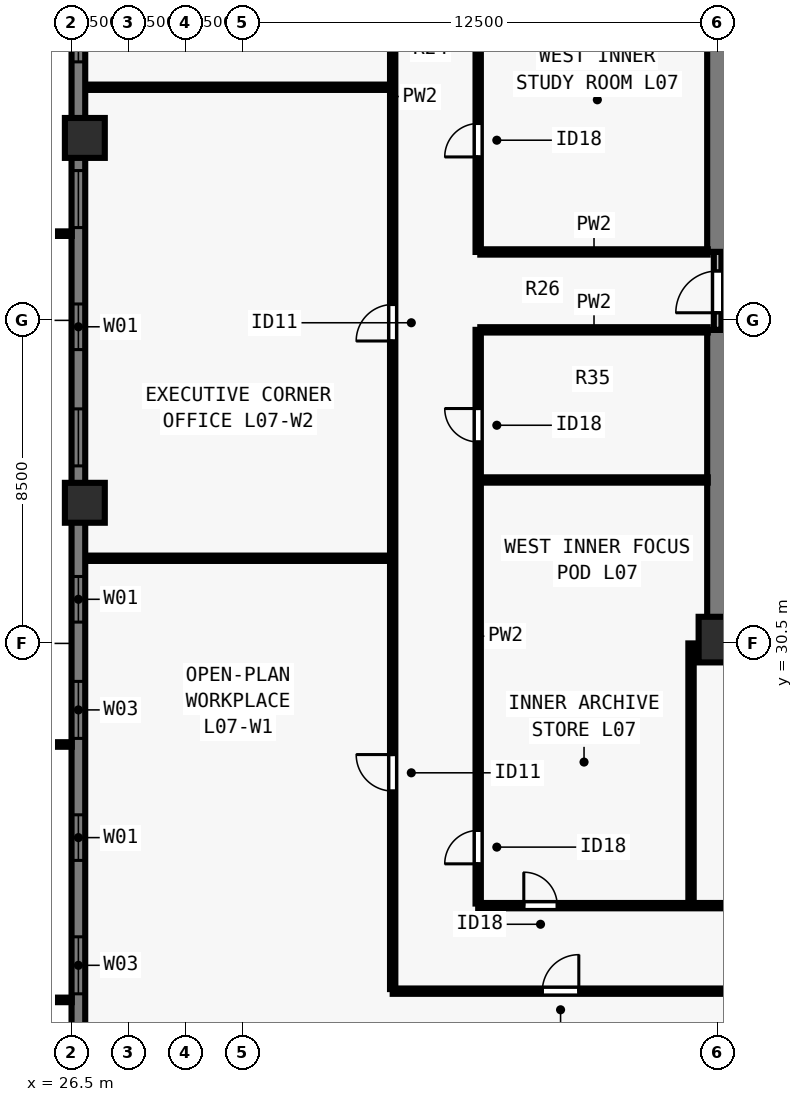
"""IFC4 building model, lengths in metres.
Left out: names, types, materials, properties, quantities, classifications, styles, units other than length and angle.
Written with IfcOpenShell. Run it as: python <this file> out.ifc"""

import sys

from ifc_helpers import new_model, si_unit, direction, frame, frame_2d, origin, origin_2d, place, context, subcontext, project, spatial, rectangle, extrude, element, fill, save


model = new_model("IFC4")
c1 = context("Model", 3, precision=1e-05, world=origin(), true_north=direction((0.0, 1.0)))
c2 = subcontext(c1, "Body", "Model", "MODEL_VIEW")
j1 = project(units=[si_unit("LENGTHUNIT", "METRE"), si_unit("PLANEANGLEUNIT", "RADIAN")], contexts=[c1])
p1 = place(None, origin())
s1 = spatial("IfcSite", under=j1, at=p1, CompositionType="ELEMENT")
p2 = place(p1, origin())
s2 = spatial("IfcBuilding", under=s1, at=p2, CompositionType="ELEMENT")
p3 = place(p2, frame((0.0, 0.0, 30.5)))
s3 = spatial("IfcBuildingStorey", under=s2, at=p3, CompositionType="ELEMENT", Elevation=30.5)
p4 = place(p3, frame((43.6, 30.6, 0.0), z_axis=(0.0, 0.0, 1.0), x_axis=(1.0, 0.0, 0.0)))
e1 = element("IfcColumn", 1, at=p4, inside=s3, PredefinedType="COLUMN", context=c2, shape_type="SweptSolid", body=[
    extrude(rectangle(XDim=1.2, YDim=1.2, at=origin_2d()), origin(), (0.0, 0.0, 1.0), 3.5),
])
for number, where, z_axis, x_axis in (
    (2, (26.85, 43.8, 0.0), (0.0, 0.0, 1.0), (0.0, 1.0, 0.0)),
    (3, (26.85, 34.2, 0.0), (0.0, 0.0, 1.0), (0.0, 1.0, 0.0)),
):
    element("IfcColumn", number, at=place(p3, frame(where, z_axis=z_axis, x_axis=x_axis)), inside=s3, PredefinedType="COLUMN", context=c2, shape_type="SweptSolid", body=[
        extrude(rectangle(XDim=1.05, YDim=1.05, at=origin_2d()), origin(), (0.0, 0.0, 1.0), 3.5),
    ])
p5 = place(p3, frame((26.68, 16.5, 0.0), z_axis=(0.0, 0.0, 1.0), x_axis=(0.0, 1.0, 0.0)))
e4 = element("IfcWall", 4, at=p5, inside=s3, PredefinedType="SOLIDWALL", context=c2, shape_type="SweptSolid", body=[
    extrude(rectangle(XDim=44.662, YDim=0.36, at=frame_2d((22.331, 0.0))), origin(), (0.0, 0.0, 1.0), 3.28),
])
p6 = place(p5, frame((4.78, 0.0, 0.8)))
e5 = element("IfcOpeningElement", 5, at=p6, cuts=e4, PredefinedType="OPENING", context=c2, shape_type="SweptSolid", body=[
    extrude(rectangle(XDim=1.5, YDim=1.544, at=frame_2d((0.75, 0.772))), frame((0.0, 0.19, 0.0), z_axis=(0.0, -1.0, 0.0), x_axis=(1.0, 0.0, 0.0)), (0.0, 0.0, 1.0), 0.38),
])
p7 = place(p5, frame((8.29, 0.0, 0.8)))
e6 = element("IfcOpeningElement", 6, at=p7, cuts=e4, PredefinedType="OPENING", context=c2, shape_type="SweptSolid", body=[
    extrude(rectangle(XDim=1.2, YDim=1.544, at=frame_2d((0.6, 0.772))), frame((0.0, 0.19, 0.0), z_axis=(0.0, -1.0, 0.0), x_axis=(1.0, 0.0, 0.0)), (0.0, 0.0, 1.0), 0.38),
])
p8 = place(p5, frame((11.5, 0.0, 0.8)))
e7 = element("IfcOpeningElement", 7, at=p8, cuts=e4, PredefinedType="OPENING", context=c2, shape_type="SweptSolid", body=[
    extrude(rectangle(XDim=1.5, YDim=1.544, at=frame_2d((0.75, 0.772))), frame((0.0, 0.19, 0.0), z_axis=(0.0, -1.0, 0.0), x_axis=(1.0, 0.0, 0.0)), (0.0, 0.0, 1.0), 0.38),
])
p9 = place(p5, frame((14.561, 0.0, 0.8)))
e8 = element("IfcOpeningElement", 8, at=p9, cuts=e4, PredefinedType="OPENING", context=c2, shape_type="SweptSolid", body=[
    extrude(rectangle(XDim=1.2, YDim=1.544, at=frame_2d((0.6, 0.772))), frame((0.0, 0.19, 0.0), z_axis=(0.0, -1.0, 0.0), x_axis=(1.0, 0.0, 0.0)), (0.0, 0.0, 1.0), 0.38),
])
p10 = place(p5, frame((18.671, 0.0, 0.8)))
e9 = element("IfcOpeningElement", 9, at=p10, cuts=e4, PredefinedType="OPENING", context=c2, shape_type="SweptSolid", body=[
    extrude(rectangle(XDim=1.5, YDim=1.544, at=frame_2d((0.75, 0.772))), frame((0.0, 0.19, 0.0), z_axis=(0.0, -1.0, 0.0), x_axis=(1.0, 0.0, 0.0)), (0.0, 0.0, 1.0), 0.38),
])
p11 = place(p5, frame((21.731, 0.0, 0.8)))
e10 = element("IfcOpeningElement", 10, at=p11, cuts=e4, PredefinedType="OPENING", context=c2, shape_type="SweptSolid", body=[
    extrude(rectangle(XDim=1.2, YDim=1.544, at=frame_2d((0.6, 0.772))), frame((0.0, 0.19, 0.0), z_axis=(0.0, -1.0, 0.0), x_axis=(1.0, 0.0, 0.0)), (0.0, 0.0, 1.0), 0.38),
])
p12 = place(p5, frame((24.941, 0.0, 0.8)))
e11 = element("IfcOpeningElement", 11, at=p12, cuts=e4, PredefinedType="OPENING", context=c2, shape_type="SweptSolid", body=[
    extrude(rectangle(XDim=1.5, YDim=1.544, at=frame_2d((0.75, 0.772))), frame((0.0, 0.19, 0.0), z_axis=(0.0, -1.0, 0.0), x_axis=(1.0, 0.0, 0.0)), (0.0, 0.0, 1.0), 0.38),
])
p13 = place(p5, frame((29.302, 0.0, 0.8)))
e12 = element("IfcOpeningElement", 12, at=p13, cuts=e4, PredefinedType="OPENING", context=c2, shape_type="SweptSolid", body=[
    extrude(rectangle(XDim=1.2, YDim=1.544, at=frame_2d((0.6, 0.772))), frame((0.0, 0.19, 0.0), z_axis=(0.0, -1.0, 0.0), x_axis=(1.0, 0.0, 0.0)), (0.0, 0.0, 1.0), 0.38),
])
p14 = place(p5, frame((31.662, 0.0, 0.8)))
e13 = element("IfcOpeningElement", 13, at=p14, cuts=e4, PredefinedType="OPENING", context=c2, shape_type="SweptSolid", body=[
    extrude(rectangle(XDim=1.5, YDim=1.544, at=frame_2d((0.75, 0.772))), frame((0.0, 0.19, 0.0), z_axis=(0.0, -1.0, 0.0), x_axis=(1.0, 0.0, 0.0)), (0.0, 0.0, 1.0), 0.38),
])
p15 = place(p5, frame((35.172, 0.0, 0.8)))
e14 = element("IfcOpeningElement", 14, at=p15, cuts=e4, PredefinedType="OPENING", context=c2, shape_type="SweptSolid", body=[
    extrude(rectangle(XDim=1.2, YDim=1.544, at=frame_2d((0.6, 0.772))), frame((0.0, 0.19, 0.0), z_axis=(0.0, -1.0, 0.0), x_axis=(1.0, 0.0, 0.0)), (0.0, 0.0, 1.0), 0.38),
])
p16 = place(p5, frame((38.382, 0.0, 0.8)))
e15 = element("IfcOpeningElement", 15, at=p16, cuts=e4, PredefinedType="OPENING", context=c2, shape_type="SweptSolid", body=[
    extrude(rectangle(XDim=1.5, YDim=1.544, at=frame_2d((0.75, 0.772))), frame((0.0, 0.19, 0.0), z_axis=(0.0, -1.0, 0.0), x_axis=(1.0, 0.0, 0.0)), (0.0, 0.0, 1.0), 0.38),
])
p17 = place(p3, frame((43.225, 30.5, 0.0), z_axis=(0.0, 0.0, 1.0), x_axis=(1.0, 0.0, 0.0)))
e16 = element("IfcWall", 16, at=p17, inside=s3, PredefinedType="SHEAR", context=c2, shape_type="SweptSolid", body=[
    extrude(rectangle(XDim=17.55, YDim=0.55, at=frame_2d((8.775, 0.0))), origin(), (0.0, 0.0, 1.0), 3.28),
])
p18 = place(p3, frame((43.5, 30.765, 0.0), z_axis=(0.0, 0.0, 1.0), x_axis=(0.0, 1.0, 0.0)))
e17 = element("IfcWall", 17, at=p18, inside=s3, PredefinedType="SHEAR", context=c2, shape_type="SweptSolid", body=[
    extrude(rectangle(XDim=7.985, YDim=0.55, at=frame_2d((3.993, 0.0))), origin(), (0.0, 0.0, 1.0), 3.28),
])
p19 = place(p3, frame((43.5, 40.8, 0.0), z_axis=(0.0, 0.0, 1.0), x_axis=(0.0, 1.0, 0.0)))
e18 = element("IfcWall", 18, at=p19, inside=s3, PredefinedType="SHEAR", context=c2, shape_type="SweptSolid", body=[
    extrude(rectangle(XDim=6.435, YDim=0.55, at=frame_2d((3.218, 0.0))), origin(), (0.0, 0.0, 1.0), 3.28),
])
p20 = place(p3, frame((43.5, 38.75, 0.0), z_axis=(0.0, 0.0, 1.0), x_axis=(0.0, 1.0, 0.0)))
e19 = element("IfcWall", 19, at=p20, inside=s3, PredefinedType="SOLIDWALL", context=c2, shape_type="SweptSolid", body=[
    extrude(rectangle(XDim=2.05, YDim=0.2, at=frame_2d((1.025, 0.0))), origin(), (0.0, 0.0, 1.0), 3.28),
])
p21 = place(p20, frame((0.45, 0.0, 0.0)))
e20 = element("IfcOpeningElement", 20, at=p21, cuts=e19, PredefinedType="OPENING", context=c2, shape_type="SweptSolid", body=[
    extrude(rectangle(XDim=1.1, YDim=2.15, at=frame_2d((0.55, 1.075))), frame((0.0, 0.11, 0.0), z_axis=(0.0, -1.0, 0.0), x_axis=(1.0, 0.0, 0.0)), (0.0, 0.0, 1.0), 0.22),
])
p22 = place(p3, frame((34.95, 21.35, 0.0), z_axis=(0.0, 0.0, 1.0), x_axis=(1.0, 0.0, 0.0)))
e21 = element("IfcWall", 21, at=p22, inside=s3, PredefinedType="PARTITIONING", context=c2, shape_type="SweptSolid", body=[
    extrude(rectangle(XDim=34.1, YDim=0.14, at=frame_2d((17.05, 0.0))), origin(), (0.0, 0.0, 1.0), 3.28),
])
p23 = place(p22, frame((3.938, 0.0, 0.0)))
e22 = element("IfcOpeningElement", 22, at=p23, cuts=e21, PredefinedType="OPENING", context=c2, shape_type="SweptSolid", body=[
    extrude(rectangle(XDim=0.96, YDim=2.12, at=frame_2d((0.48, 1.06))), frame((0.0, 0.08, 0.0), z_axis=(0.0, -1.0, 0.0), x_axis=(1.0, 0.0, 0.0)), (0.0, 0.0, 1.0), 0.16),
])
p24 = place(p22, frame((28.617, 0.0, 0.0)))
e23 = element("IfcOpeningElement", 23, at=p24, cuts=e21, PredefinedType="OPENING", context=c2, shape_type="SweptSolid", body=[
    extrude(rectangle(XDim=0.96, YDim=2.12, at=frame_2d((0.48, 1.06))), frame((0.0, 0.08, 0.0), z_axis=(0.0, -1.0, 0.0), x_axis=(1.0, 0.0, 0.0)), (0.0, 0.0, 1.0), 0.16),
])
p25 = place(p3, frame((34.95, 21.405, 0.0), z_axis=(0.0, 0.0, 1.0), x_axis=(0.0, 1.0, 0.0)))
e24 = element("IfcWall", 24, at=p25, inside=s3, PredefinedType="PARTITIONING", context=c2, shape_type="SweptSolid", body=[
    extrude(rectangle(XDim=35.19, YDim=0.14, at=frame_2d((17.595, 0.0))), origin(), (0.0, 0.0, 1.0), 3.28),
])
p26 = place(p25, frame((5.21, 0.0, 0.0)))
e25 = element("IfcOpeningElement", 25, at=p26, cuts=e24, PredefinedType="OPENING", context=c2, shape_type="SweptSolid", body=[
    extrude(rectangle(XDim=0.96, YDim=2.12, at=frame_2d((0.48, 1.06))), frame((0.0, 0.08, 0.0), z_axis=(0.0, -1.0, 0.0), x_axis=(1.0, 0.0, 0.0)), (0.0, 0.0, 1.0), 0.16),
])
p27 = place(p25, frame((17.052, 0.0, 0.0)))
e26 = element("IfcOpeningElement", 26, at=p27, cuts=e24, PredefinedType="OPENING", context=c2, shape_type="SweptSolid", body=[
    extrude(rectangle(XDim=0.96, YDim=2.12, at=frame_2d((0.48, 1.06))), frame((0.0, 0.08, 0.0), z_axis=(0.0, -1.0, 0.0), x_axis=(1.0, 0.0, 0.0)), (0.0, 0.0, 1.0), 0.16),
])
p28 = place(p25, frame((28.957, 0.0, 0.0)))
e27 = element("IfcOpeningElement", 27, at=p28, cuts=e24, PredefinedType="OPENING", context=c2, shape_type="SweptSolid", body=[
    extrude(rectangle(XDim=0.96, YDim=2.12, at=frame_2d((0.48, 1.06))), frame((0.0, 0.08, 0.0), z_axis=(0.0, -1.0, 0.0), x_axis=(1.0, 0.0, 0.0)), (0.0, 0.0, 1.0), 0.16),
])
p29 = place(p3, frame((37.2, 23.6, 0.0), z_axis=(0.0, 0.0, 1.0), x_axis=(1.0, 0.0, 0.0)))
e28 = element("IfcWall", 28, at=p29, inside=s3, PredefinedType="PARTITIONING", context=c2, shape_type="SweptSolid", body=[
    extrude(rectangle(XDim=29.6, YDim=0.14, at=frame_2d((14.8, 0.0))), origin(), (0.0, 0.0, 1.0), 3.28),
])
p30 = place(p29, frame((1.2, 0.0, 0.0)))
e29 = element("IfcOpeningElement", 29, at=p30, cuts=e28, PredefinedType="OPENING", context=c2, shape_type="SweptSolid", body=[
    extrude(rectangle(XDim=0.88, YDim=2.1, at=frame_2d((0.44, 1.05))), frame((0.0, 0.08, 0.0), z_axis=(0.0, -1.0, 0.0), x_axis=(1.0, 0.0, 0.0)), (0.0, 0.0, 1.0), 0.16),
])
p31 = place(p29, frame((11.3, 0.0, 0.0)))
e30 = element("IfcOpeningElement", 30, at=p31, cuts=e28, PredefinedType="OPENING", context=c2, shape_type="SweptSolid", body=[
    extrude(rectangle(XDim=0.88, YDim=2.1, at=frame_2d((0.44, 1.05))), frame((0.0, 0.08, 0.0), z_axis=(0.0, -1.0, 0.0), x_axis=(1.0, 0.0, 0.0)), (0.0, 0.0, 1.0), 0.16),
])
p32 = place(p29, frame((21.8, 0.0, 0.0)))
e31 = element("IfcOpeningElement", 31, at=p32, cuts=e28, PredefinedType="OPENING", context=c2, shape_type="SweptSolid", body=[
    extrude(rectangle(XDim=0.88, YDim=2.1, at=frame_2d((0.44, 1.05))), frame((0.0, 0.08, 0.0), z_axis=(0.0, -1.0, 0.0), x_axis=(1.0, 0.0, 0.0)), (0.0, 0.0, 1.0), 0.16),
])
p33 = place(p3, frame((37.2, 23.655, 0.0), z_axis=(0.0, 0.0, 1.0), x_axis=(0.0, 1.0, 0.0)))
e32 = element("IfcWall", 32, at=p33, inside=s3, PredefinedType="PARTITIONING", context=c2, shape_type="SweptSolid", body=[
    extrude(rectangle(XDim=15.095, YDim=0.14, at=frame_2d((7.547, 0.0))), origin(), (0.0, 0.0, 1.0), 3.28),
])
p34 = place(p33, frame((1.045, 0.0, 0.0)))
e33 = element("IfcOpeningElement", 33, at=p34, cuts=e32, PredefinedType="OPENING", context=c2, shape_type="SweptSolid", body=[
    extrude(rectangle(XDim=0.88, YDim=2.1, at=frame_2d((0.44, 1.05))), frame((0.0, 0.08, 0.0), z_axis=(0.0, -1.0, 0.0), x_axis=(1.0, 0.0, 0.0)), (0.0, 0.0, 1.0), 0.16),
])
p35 = place(p33, frame((12.145, 0.0, 0.0)))
e34 = element("IfcOpeningElement", 34, at=p35, cuts=e32, PredefinedType="OPENING", context=c2, shape_type="SweptSolid", body=[
    extrude(rectangle(XDim=0.88, YDim=2.1, at=frame_2d((0.44, 1.05))), frame((0.0, 0.08, 0.0), z_axis=(0.0, -1.0, 0.0), x_axis=(1.0, 0.0, 0.0)), (0.0, 0.0, 1.0), 0.16),
])
p36 = place(p3, frame((37.2, 40.8, 0.0), z_axis=(0.0, 0.0, 1.0), x_axis=(0.0, 1.0, 0.0)))
e35 = element("IfcWall", 35, at=p36, inside=s3, PredefinedType="PARTITIONING", context=c2, shape_type="SweptSolid", body=[
    extrude(rectangle(XDim=13.545, YDim=0.14, at=frame_2d((6.772, 0.0))), origin(), (0.0, 0.0, 1.0), 3.28),
])
p37 = place(p36, frame((2.5, 0.0, 0.0)))
e36 = element("IfcOpeningElement", 36, at=p37, cuts=e35, PredefinedType="OPENING", context=c2, shape_type="SweptSolid", body=[
    extrude(rectangle(XDim=0.88, YDim=2.1, at=frame_2d((0.44, 1.05))), frame((0.0, 0.08, 0.0), z_axis=(0.0, -1.0, 0.0), x_axis=(1.0, 0.0, 0.0)), (0.0, 0.0, 1.0), 0.16),
])
for number, where, z_axis, x_axis in (
    (37, (37.255, 38.75, 0.0), (0.0, 0.0, 1.0), (1.0, 0.0, 0.0)),
    (38, (37.255, 40.8, 0.0), (0.0, 0.0, 1.0), (1.0, 0.0, 0.0)),
):
    element("IfcWall", number, at=place(p3, frame(where, z_axis=z_axis, x_axis=x_axis)), inside=s3, PredefinedType="PARTITIONING", context=c2, shape_type="SweptSolid", body=[
        extrude(rectangle(XDim=5.985, YDim=0.14, at=frame_2d((2.993, 0.0))), origin(), (0.0, 0.0, 1.0), 3.28),
    ])
p38 = place(p3, frame((42.8, 23.655, 0.0), z_axis=(0.0, 0.0, 1.0), x_axis=(0.0, 1.0, 0.0)))
e39 = element("IfcWall", 39, at=p38, inside=s3, PredefinedType="PARTITIONING", context=c2, shape_type="SweptSolid", body=[
    extrude(rectangle(XDim=6.845, YDim=0.14, at=frame_2d((3.422, 0.0))), origin(), (0.0, 0.0, 1.0), 2.439),
])
p39 = place(p3, frame((37.255, 34.8, 0.0), z_axis=(0.0, 0.0, 1.0), x_axis=(1.0, 0.0, 0.0)))
e40 = element("IfcWall", 40, at=p39, inside=s3, PredefinedType="PARTITIONING", context=c2, shape_type="SweptSolid", body=[
    extrude(rectangle(XDim=5.985, YDim=0.14, at=frame_2d((2.993, 0.0))), origin(), (0.0, 0.0, 1.0), 3.28),
])
for number, where, z_axis, x_axis in (
    (41, (26.92, 32.74, 0.0), (0.0, 0.0, 1.0), (1.0, 0.0, 0.0)),
    (42, (26.92, 45.134, 0.0), (0.0, 0.0, 1.0), (1.0, 0.0, 0.0)),
):
    element("IfcWall", number, at=place(p3, frame(where, z_axis=z_axis, x_axis=x_axis)), inside=s3, PredefinedType="PARTITIONING", context=c2, shape_type="SweptSolid", body=[
        extrude(rectangle(XDim=7.93, YDim=0.14, at=frame_2d((3.965, 0.0))), origin(), (0.0, 0.0, 1.0), 2.439),
    ])
p40 = place(p6, origin())
e43 = element("IfcWindow", 43, at=p40, inside=s3, PartitioningType="SINGLE_PANEL", PredefinedType="WINDOW", context=c2, shape_type="SweptSolid", body=[
    extrude(rectangle(XDim=1.5, YDim=1.544, at=frame_2d((0.75, 0.772))), frame((0.0, -0.05, 0.0), z_axis=(0.0, -1.0, 0.0), x_axis=(1.0, 0.0, 0.0)), (0.0, 0.0, 1.0), 0.06),
])
fill(e5, e43)
p41 = place(p7, origin())
e44 = element("IfcWindow", 44, at=p41, inside=s3, PartitioningType="SINGLE_PANEL", PredefinedType="WINDOW", context=c2, shape_type="SweptSolid", body=[
    extrude(rectangle(XDim=1.2, YDim=1.544, at=frame_2d((0.6, 0.772))), frame((0.0, -0.05, 0.0), z_axis=(0.0, -1.0, 0.0), x_axis=(1.0, 0.0, 0.0)), (0.0, 0.0, 1.0), 0.06),
])
fill(e6, e44)
p42 = place(p8, origin())
e45 = element("IfcWindow", 45, at=p42, inside=s3, PartitioningType="SINGLE_PANEL", PredefinedType="WINDOW", context=c2, shape_type="SweptSolid", body=[
    extrude(rectangle(XDim=1.5, YDim=1.544, at=frame_2d((0.75, 0.772))), frame((0.0, -0.05, 0.0), z_axis=(0.0, -1.0, 0.0), x_axis=(1.0, 0.0, 0.0)), (0.0, 0.0, 1.0), 0.06),
])
fill(e7, e45)
p43 = place(p9, origin())
e46 = element("IfcWindow", 46, at=p43, inside=s3, PartitioningType="SINGLE_PANEL", PredefinedType="WINDOW", context=c2, shape_type="SweptSolid", body=[
    extrude(rectangle(XDim=1.2, YDim=1.544, at=frame_2d((0.6, 0.772))), frame((0.0, -0.05, 0.0), z_axis=(0.0, -1.0, 0.0), x_axis=(1.0, 0.0, 0.0)), (0.0, 0.0, 1.0), 0.06),
])
fill(e8, e46)
p44 = place(p10, origin())
e47 = element("IfcWindow", 47, at=p44, inside=s3, PartitioningType="SINGLE_PANEL", PredefinedType="WINDOW", context=c2, shape_type="SweptSolid", body=[
    extrude(rectangle(XDim=1.5, YDim=1.544, at=frame_2d((0.75, 0.772))), frame((0.0, -0.05, 0.0), z_axis=(0.0, -1.0, 0.0), x_axis=(1.0, 0.0, 0.0)), (0.0, 0.0, 1.0), 0.06),
])
fill(e9, e47)
p45 = place(p11, origin())
e48 = element("IfcWindow", 48, at=p45, inside=s3, PartitioningType="SINGLE_PANEL", PredefinedType="WINDOW", context=c2, shape_type="SweptSolid", body=[
    extrude(rectangle(XDim=1.2, YDim=1.544, at=frame_2d((0.6, 0.772))), frame((0.0, -0.05, 0.0), z_axis=(0.0, -1.0, 0.0), x_axis=(1.0, 0.0, 0.0)), (0.0, 0.0, 1.0), 0.06),
])
fill(e10, e48)
p46 = place(p12, origin())
e49 = element("IfcWindow", 49, at=p46, inside=s3, PartitioningType="SINGLE_PANEL", PredefinedType="WINDOW", context=c2, shape_type="SweptSolid", body=[
    extrude(rectangle(XDim=1.5, YDim=1.544, at=frame_2d((0.75, 0.772))), frame((0.0, -0.05, 0.0), z_axis=(0.0, -1.0, 0.0), x_axis=(1.0, 0.0, 0.0)), (0.0, 0.0, 1.0), 0.06),
])
fill(e11, e49)
p47 = place(p13, origin())
e50 = element("IfcWindow", 50, at=p47, inside=s3, PartitioningType="SINGLE_PANEL", PredefinedType="WINDOW", context=c2, shape_type="SweptSolid", body=[
    extrude(rectangle(XDim=1.2, YDim=1.544, at=frame_2d((0.6, 0.772))), frame((0.0, -0.05, 0.0), z_axis=(0.0, -1.0, 0.0), x_axis=(1.0, 0.0, 0.0)), (0.0, 0.0, 1.0), 0.06),
])
fill(e12, e50)
p48 = place(p21, origin())
e51 = element("IfcDoor", 51, at=p48, inside=s3, OperationType="SINGLE_SWING_LEFT", PredefinedType="DOOR", context=c2, shape_type="SweptSolid", body=[
    extrude(rectangle(XDim=1.1, YDim=2.15, at=frame_2d((0.55, 1.075))), frame((0.0, 0.025, 0.0), z_axis=(0.0, -1.0, 0.0), x_axis=(1.0, 0.0, 0.0)), (0.0, 0.0, 1.0), 0.05),
])
fill(e20, e51)
p49 = place(p30, origin())
e52 = element("IfcDoor", 52, at=p49, inside=s3, OperationType="SINGLE_SWING_LEFT", PredefinedType="DOOR", context=c2, shape_type="SweptSolid", body=[
    extrude(rectangle(XDim=0.88, YDim=2.1, at=frame_2d((0.44, 1.05))), frame((0.0, 0.025, 0.0), z_axis=(0.0, -1.0, 0.0), x_axis=(1.0, 0.0, 0.0)), (0.0, 0.0, 1.0), 0.05),
])
fill(e29, e52)
p50 = place(p34, origin())
e53 = element("IfcDoor", 53, at=p50, inside=s3, OperationType="SINGLE_SWING_LEFT", PredefinedType="DOOR", context=c2, shape_type="SweptSolid", body=[
    extrude(rectangle(XDim=0.88, YDim=2.1, at=frame_2d((0.44, 1.05))), frame((0.0, 0.025, 0.0), z_axis=(0.0, -1.0, 0.0), x_axis=(1.0, 0.0, 0.0)), (0.0, 0.0, 1.0), 0.05),
])
fill(e33, e53)
p51 = place(p35, origin())
e54 = element("IfcDoor", 54, at=p51, inside=s3, OperationType="SINGLE_SWING_RIGHT", PredefinedType="DOOR", context=c2, shape_type="SweptSolid", body=[
    extrude(rectangle(XDim=0.88, YDim=2.1, at=frame_2d((0.44, 1.05))), frame((0.0, 0.025, 0.0), z_axis=(0.0, -1.0, 0.0), x_axis=(1.0, 0.0, 0.0)), (0.0, 0.0, 1.0), 0.05),
])
fill(e34, e54)
p52 = place(p37, origin())
e55 = element("IfcDoor", 55, at=p52, inside=s3, OperationType="SINGLE_SWING_LEFT", PredefinedType="DOOR", context=c2, shape_type="SweptSolid", body=[
    extrude(rectangle(XDim=0.88, YDim=2.1, at=frame_2d((0.44, 1.05))), frame((0.0, 0.025, 0.0), z_axis=(0.0, -1.0, 0.0), x_axis=(1.0, 0.0, 0.0)), (0.0, 0.0, 1.0), 0.05),
])
fill(e36, e55)
p53 = place(p23, origin())
e56 = element("IfcDoor", 56, at=p53, inside=s3, OperationType="SINGLE_SWING_RIGHT", PredefinedType="DOOR", context=c2, shape_type="SweptSolid", body=[
    extrude(rectangle(XDim=0.96, YDim=2.12, at=frame_2d((0.48, 1.06))), frame((0.0, 0.025, 0.0), z_axis=(0.0, -1.0, 0.0), x_axis=(1.0, 0.0, 0.0)), (0.0, 0.0, 1.0), 0.05),
])
fill(e22, e56)
p54 = place(p26, origin())
e57 = element("IfcDoor", 57, at=p54, inside=s3, OperationType="SINGLE_SWING_RIGHT", PredefinedType="DOOR", context=c2, shape_type="SweptSolid", body=[
    extrude(rectangle(XDim=0.96, YDim=2.12, at=frame_2d((0.48, 1.06))), frame((0.0, 0.025, 0.0), z_axis=(0.0, -1.0, 0.0), x_axis=(1.0, 0.0, 0.0)), (0.0, 0.0, 1.0), 0.05),
])
fill(e25, e57)
p55 = place(p27, origin())
e58 = element("IfcDoor", 58, at=p55, inside=s3, OperationType="SINGLE_SWING_LEFT", PredefinedType="DOOR", context=c2, shape_type="SweptSolid", body=[
    extrude(rectangle(XDim=0.96, YDim=2.12, at=frame_2d((0.48, 1.06))), frame((0.0, 0.025, 0.0), z_axis=(0.0, -1.0, 0.0), x_axis=(1.0, 0.0, 0.0)), (0.0, 0.0, 1.0), 0.05),
])
fill(e26, e58)
save(model, sys.argv[1])
